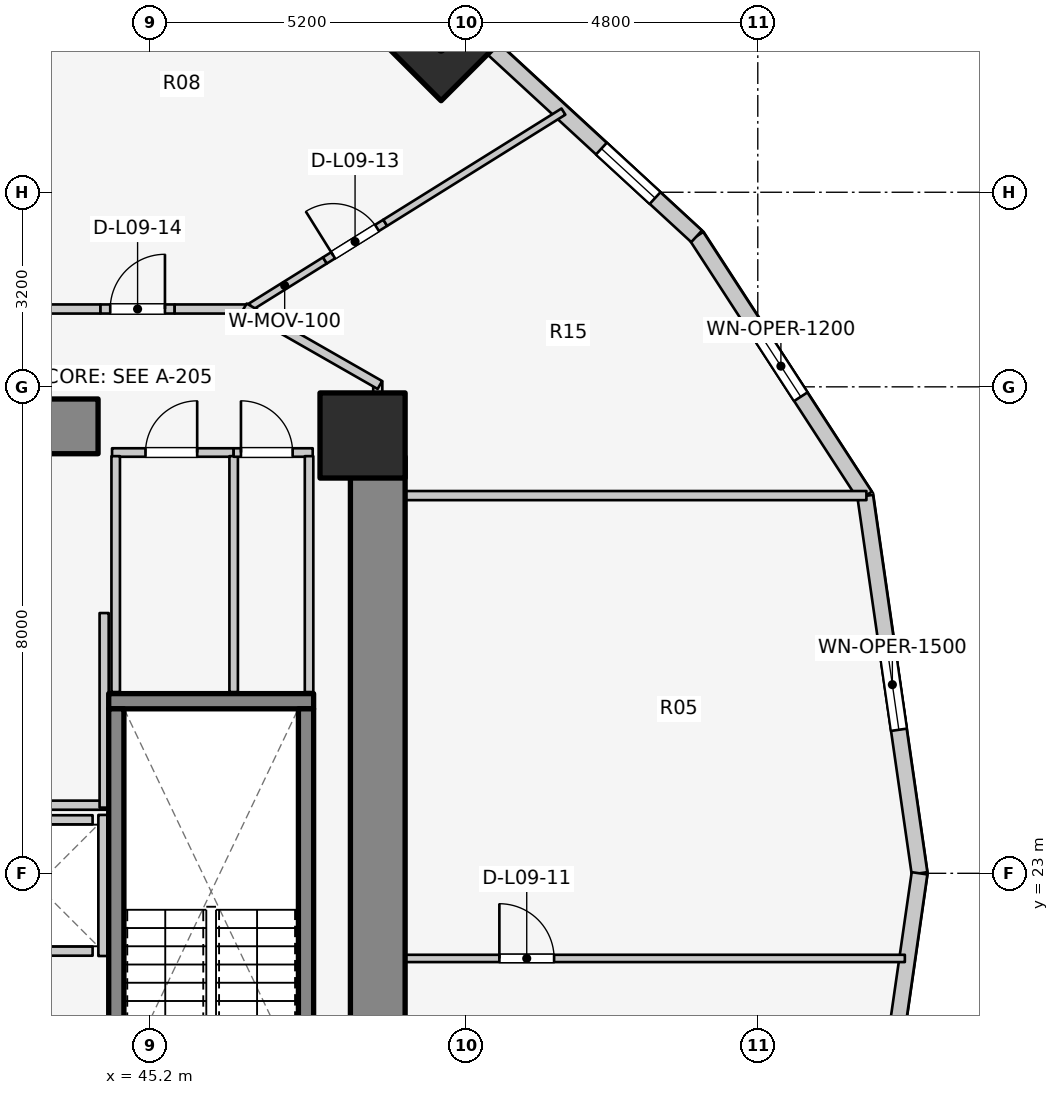
"""IFC4 building model, lengths in metres.
Left out: names, types, materials, properties, quantities, classifications, styles, units other than length and angle.
Written with IfcOpenShell. Run it as: python <this file> out.ifc"""

import sys

from ifc_helpers import new_model, si_unit, direction, frame, frame_2d, origin, origin_2d, place, context, subcontext, project, spatial, rectangle, extrude, element, fill, save


model = new_model("IFC4")
c1 = context("Model", 3, precision=1e-05, world=origin(), true_north=direction((0.0, 1.0)))
c2 = subcontext(c1, "Body", "Model", "MODEL_VIEW")
j1 = project(units=[si_unit("LENGTHUNIT", "METRE"), si_unit("PLANEANGLEUNIT", "RADIAN")], contexts=[c1])
p1 = place(None, origin())
s1 = spatial("IfcSite", under=j1, at=p1, CompositionType="ELEMENT")
p2 = place(p1, origin())
s2 = spatial("IfcBuilding", under=s1, at=p2, CompositionType="ELEMENT")
p3 = place(p2, frame((0.0, 0.0, 33.8)))
s3 = spatial("IfcBuildingStorey", under=s2, at=p3, CompositionType="ELEMENT", Elevation=33.8)
p4 = place(p3, frame((48.95, 17.05, 0.0), z_axis=(0.0, 0.0, 1.0), x_axis=(0.0, 1.0, 0.0)))
e1 = element("IfcWall", 1, at=p4, inside=s3, PredefinedType="SHEAR", context=c2, shape_type="SweptSolid", body=[
    extrude(rectangle(XDim=12.8, YDim=0.9, at=frame_2d((6.4, 0.0))), origin(), (0.0, 0.0, 1.0), 3.1),
])
p5 = place(p3, frame((39.85, 30.35, 0.0), z_axis=(0.0, 0.0, 1.0), x_axis=(1.0, 0.0, 0.0)))
e2 = element("IfcWall", 2, at=p5, inside=s3, PredefinedType="SHEAR", context=c2, shape_type="SweptSolid", body=[
    extrude(rectangle(XDim=4.5, YDim=0.9, at=frame_2d((2.25, 0.0))), origin(), (0.0, 0.0, 1.0), 3.1),
])
p6 = place(p3, frame((44.525, 25.83, 0.0), z_axis=(0.0, 0.0, 1.0), x_axis=(1.0, 0.0, 0.0)))
e3 = element("IfcWall", 3, at=p6, inside=s3, PredefinedType="SOLIDWALL", context=c2, shape_type="SweptSolid", body=[
    extrude(rectangle(XDim=3.37, YDim=0.25, at=frame_2d((1.685, 0.0))), origin(), (0.0, 0.0, 1.0), 3.1),
])
for number, where, z_axis, x_axis in (
    (4, (44.65, 17.895, 0.0), (0.0, 0.0, 1.0), (0.0, 1.0, 0.0)),
    (5, (47.77, 17.895, 0.0), (0.0, 0.0, 1.0), (0.0, 1.0, 0.0)),
):
    element("IfcWall", number, at=place(p3, frame(where, z_axis=z_axis, x_axis=x_axis)), inside=s3, PredefinedType="SOLIDWALL", context=c2, shape_type="SweptSolid", body=[
        extrude(rectangle(XDim=7.81, YDim=0.25, at=frame_2d((3.905, 0.0))), origin(), (0.0, 0.0, 1.0), 3.1),
    ])
p7 = place(p3, frame((48.7, 30.2, 0.0), z_axis=(0.0, 0.0, 1.0), x_axis=(1.0, 0.0, 0.0)))
e6 = element("IfcColumn", 6, at=p7, inside=s3, PredefinedType="COLUMN", context=c2, shape_type="SweptSolid", body=[
    extrude(rectangle(XDim=1.4, YDim=1.4, at=origin_2d()), origin(), (0.0, 0.0, 1.0), 3.1),
])
p8 = place(p3, frame((49.992, 36.554, 0.0), z_axis=(0.0, 0.0, 1.0), x_axis=(0.707106781187, 0.707106781187, 0.0)))
e7 = element("IfcColumn", 7, at=p8, inside=s3, PredefinedType="COLUMN", context=c2, shape_type="SweptSolid", body=[
    extrude(rectangle(XDim=1.2, YDim=1.2, at=origin_2d()), origin(), (0.0, 0.0, 1.0), 3.1),
])
p9 = place(p3, frame((57.86, 23.0, 0.0), z_axis=(0.0, 0.0, 1.0), x_axis=(-0.142528001686, 0.989790770181, 0.0)))
e8 = element("IfcWall", 8, at=p9, inside=s3, PredefinedType="STANDARD", context=c2, shape_type="SweptSolid", body=[
    extrude(rectangle(XDim=6.269, YDim=0.26, at=frame_2d((3.135, 0.0))), origin(), (0.0, 0.0, 1.0), 2.57),
])
p10 = place(p9, frame((2.385, 0.0, 0.75)))
e9 = element("IfcOpeningElement", 9, at=p10, cuts=e8, PredefinedType="OPENING", context=c2, shape_type="SweptSolid", body=[
    extrude(rectangle(XDim=1.5, YDim=1.6, at=frame_2d((0.75, 0.8))), frame((0.0, 0.14, 0.0), z_axis=(0.0, -1.0, 0.0), x_axis=(1.0, 0.0, 0.0)), (0.0, 0.0, 1.0), 0.28),
])
p11 = place(p3, frame((56.967, 29.205, 0.0), z_axis=(0.0, 0.0, 1.0), x_axis=(-0.544578722263, 0.838709732421, 0.0)))
e10 = element("IfcWall", 10, at=p11, inside=s3, PredefinedType="STANDARD", context=c2, shape_type="SweptSolid", body=[
    extrude(rectangle(XDim=5.092, YDim=0.26, at=frame_2d((2.546, 0.0))), origin(), (0.0, 0.0, 1.0), 1.22),
])
p12 = place(p11, frame((1.946, 0.0, 0.15)))
e11 = element("IfcOpeningElement", 11, at=p12, cuts=e10, PredefinedType="OPENING", context=c2, shape_type="SweptSolid", body=[
    extrude(rectangle(XDim=1.2, YDim=0.9, at=frame_2d((0.6, 0.45))), frame((0.0, 0.14, 0.0), z_axis=(0.0, -1.0, 0.0), x_axis=(1.0, 0.0, 0.0)), (0.0, 0.0, 1.0), 0.28),
])
p13 = place(p3, frame((54.194, 33.476, 0.0), z_axis=(0.0, 0.0, 1.0), x_axis=(-0.735655109293, 0.67735630223, 0.0)))
e12 = element("IfcWall", 12, at=p13, inside=s3, PredefinedType="STANDARD", context=c2, shape_type="SweptSolid", body=[
    extrude(rectangle(XDim=5.151, YDim=0.26, at=frame_2d((2.575, 0.0))), origin(), (0.0, 0.0, 1.0), 1.22),
])
p14 = place(p13, frame((0.929, 0.0, 0.15)))
e13 = element("IfcOpeningElement", 13, at=p14, cuts=e12, PredefinedType="OPENING", context=c2, shape_type="SweptSolid", body=[
    extrude(rectangle(XDim=1.2, YDim=0.9, at=frame_2d((0.6, 0.45))), frame((0.0, 0.14, 0.0), z_axis=(0.0, -1.0, 0.0), x_axis=(1.0, 0.0, 0.0)), (0.0, 0.0, 1.0), 0.28),
])
p15 = place(p3, frame((56.967, 16.795, 0.0), z_axis=(0.0, 0.0, 1.0), x_axis=(0.142528001686, 0.989790770181, 0.0)))
e14 = element("IfcWall", 14, at=p15, inside=s3, PredefinedType="STANDARD", context=c2, shape_type="SweptSolid", body=[
    extrude(rectangle(XDim=6.269, YDim=0.26, at=frame_2d((3.135, 0.0))), origin(), (0.0, 0.0, 1.0), 2.57),
])
p16 = place(p15, frame((1.852, 0.0, 0.75)))
e15 = element("IfcOpeningElement", 15, at=p16, cuts=e14, PredefinedType="OPENING", context=c2, shape_type="SweptSolid", body=[
    extrude(rectangle(XDim=1.2, YDim=1.5, at=frame_2d((0.6, 0.75))), frame((0.0, 0.14, 0.0), z_axis=(0.0, -1.0, 0.0), x_axis=(1.0, 0.0, 0.0)), (0.0, 0.0, 1.0), 0.28),
])
for number, where, z_axis, x_axis in (
    (16, (42.44, 21.72, 0.0), (0.0, 0.0, 1.0), (1.0, 0.0, 0.0)),
    (17, (42.44, 23.88, 0.0), (0.0, 0.0, 1.0), (1.0, 0.0, 0.0)),
):
    element("IfcWall", number, at=place(p3, frame(where, z_axis=z_axis, x_axis=x_axis)), inside=s3, PredefinedType="SOLIDWALL", context=c2, shape_type="SweptSolid", body=[
        extrude(rectangle(XDim=1.82, YDim=0.15, at=frame_2d((0.91, 0.0))), origin(), (0.0, 0.0, 1.0), 2.575),
    ])
p17 = place(p3, frame((44.43, 21.64, 0.0), z_axis=(0.0, 0.0, 1.0), x_axis=(0.0, 1.0, 0.0)))
e18 = element("IfcWall", 18, at=p17, inside=s3, PredefinedType="SOLIDWALL", context=c2, shape_type="SweptSolid", body=[
    extrude(rectangle(XDim=2.32, YDim=0.15, at=frame_2d((1.16, 0.0))), origin(), (0.0, 0.0, 1.0), 2.575),
])
p18 = place(p3, frame((39.4, 24.12, 0.0), z_axis=(0.0, 0.0, 1.0), x_axis=(1.0, 0.0, 0.0)))
e19 = element("IfcWall", 19, at=p18, inside=s3, PredefinedType="PARTITIONING", context=c2, shape_type="SweptSolid", body=[
    extrude(rectangle(XDim=5.08, YDim=0.15, at=frame_2d((2.54, 0.0))), origin(), (0.0, 0.0, 1.0), 2.12),
])
p19 = place(p3, frame((44.45, 24.08, 0.0), z_axis=(0.0, 0.0, 1.0), x_axis=(0.0, 1.0, 0.0)))
e20 = element("IfcWall", 20, at=p19, inside=s3, PredefinedType="PARTITIONING", context=c2, shape_type="SweptSolid", body=[
    extrude(rectangle(XDim=3.2, YDim=0.15, at=frame_2d((1.6, 0.0))), origin(), (0.0, 0.0, 1.0), 2.575),
])
p20 = place(p3, frame((44.58, 29.92, 0.0), z_axis=(0.0, 0.0, 1.0), x_axis=(1.0, 0.0, 0.0)))
e21 = element("IfcWall", 21, at=p20, inside=s3, PredefinedType="PLUMBINGWALL", context=c2, shape_type="SweptSolid", body=[
    extrude(rectangle(XDim=2.0, YDim=0.14, at=frame_2d((1.0, 0.0))), origin(), (0.0, 0.0, 1.0), 2.575),
])
p21 = place(p20, frame((0.55, 0.0, 0.0)))
e22 = element("IfcOpeningElement", 22, at=p21, cuts=e21, PredefinedType="OPENING", context=c2, shape_type="SweptSolid", body=[
    extrude(rectangle(XDim=0.85, YDim=2.05, at=frame_2d((0.425, 1.025))), frame((0.0, 0.08, 0.0), z_axis=(0.0, -1.0, 0.0), x_axis=(1.0, 0.0, 0.0)), (0.0, 0.0, 1.0), 0.16),
])
for number, where, z_axis, x_axis in (
    (23, (44.64, 25.98, 0.0), (0.0, 0.0, 1.0), (0.0, 1.0, 0.0)),
    (24, (46.58, 25.98, 0.0), (0.0, 0.0, 1.0), (0.0, 1.0, 0.0)),
):
    element("IfcWall", number, at=place(p3, frame(where, z_axis=z_axis, x_axis=x_axis)), inside=s3, PredefinedType="PLUMBINGWALL", context=c2, shape_type="SweptSolid", body=[
        extrude(rectangle(XDim=3.88, YDim=0.14, at=frame_2d((1.94, 0.0))), origin(), (0.0, 0.0, 1.0), 2.575),
    ])
p22 = place(p3, frame((46.58, 29.92, 0.0), z_axis=(0.0, 0.0, 1.0), x_axis=(1.0, 0.0, 0.0)))
e25 = element("IfcWall", 25, at=p22, inside=s3, PredefinedType="PLUMBINGWALL", context=c2, shape_type="SweptSolid", body=[
    extrude(rectangle(XDim=1.3, YDim=0.14, at=frame_2d((0.65, 0.0))), origin(), (0.0, 0.0, 1.0), 2.575),
])
p23 = place(p22, frame((0.12, 0.0, 0.0)))
e26 = element("IfcOpeningElement", 26, at=p23, cuts=e25, PredefinedType="OPENING", context=c2, shape_type="SweptSolid", body=[
    extrude(rectangle(XDim=0.85, YDim=2.05, at=frame_2d((0.425, 1.025))), frame((0.0, 0.08, 0.0), z_axis=(0.0, -1.0, 0.0), x_axis=(1.0, 0.0, 0.0)), (0.0, 0.0, 1.0), 0.16),
])
p24 = place(p3, frame((47.82, 25.98, 0.0), z_axis=(0.0, 0.0, 1.0), x_axis=(0.0, 1.0, 0.0)))
e27 = element("IfcWall", 27, at=p24, inside=s3, PredefinedType="PLUMBINGWALL", context=c2, shape_type="SweptSolid", body=[
    extrude(rectangle(XDim=3.88, YDim=0.14, at=frame_2d((1.94, 0.0))), origin(), (0.0, 0.0, 1.0), 2.575),
])
p25 = place(p3, frame((48.95, 29.212, 0.0), z_axis=(0.0, 0.0, 1.0), x_axis=(1.0, 0.0, 0.0)))
e28 = element("IfcWall", 28, at=p25, inside=s3, PredefinedType="PARTITIONING", context=c2, shape_type="SweptSolid", body=[
    extrude(rectangle(XDim=8.036, YDim=0.15, at=frame_2d((4.018, 0.0))), origin(), (0.0, 0.0, 1.0), 2.575),
])
p26 = place(p3, frame((48.95, 21.6, 0.0), z_axis=(0.0, 0.0, 1.0), x_axis=(1.0, 0.0, 0.0)))
e29 = element("IfcWall", 29, at=p26, inside=s3, PredefinedType="MOVABLE", context=c2, shape_type="SweptSolid", body=[
    extrude(rectangle(XDim=8.669, YDim=0.12, at=frame_2d((4.334, 0.0))), origin(), (0.0, 0.0, 1.0), 2.575),
])
p27 = place(p26, frame((2.0, 0.0, 0.0)))
e30 = element("IfcOpeningElement", 30, at=p27, cuts=e29, PredefinedType="OPENING", context=c2, shape_type="SweptSolid", body=[
    extrude(rectangle(XDim=0.9, YDim=2.1, at=frame_2d((0.45, 1.05))), frame((0.0, 0.07, 0.0), z_axis=(0.0, -1.0, 0.0), x_axis=(1.0, 0.0, 0.0)), (0.0, 0.0, 1.0), 0.14),
])
p28 = place(p3, frame((48.95, 29.8, 0.0), z_axis=(0.0, 0.0, 1.0), x_axis=(0.0, 1.0, 0.0)))
e31 = element("IfcWall", 31, at=p28, inside=s3, PredefinedType="PARTITIONING", context=c2, shape_type="SweptSolid", body=[
    extrude(rectangle(XDim=1.29, YDim=0.15, at=frame_2d((0.645, 0.0))), origin(), (0.0, 0.0, 1.0), 1.22),
])
p29 = place(p3, frame((46.758, 32.253, 0.0), z_axis=(0.0, 0.0, 1.0), x_axis=(0.848437888741, 0.529294954585, 0.0)))
e32 = element("IfcWall", 32, at=p29, inside=s3, PredefinedType="MOVABLE", context=c2, shape_type="SweptSolid", body=[
    extrude(rectangle(XDim=1.559, YDim=0.12, at=frame_2d((0.78, 0.0))), origin(), (0.0, 0.0, 1.0), 2.575),
])
p30 = place(p3, frame((48.08, 33.079, 0.0), z_axis=(0.0, 0.0, 1.0), x_axis=(0.848396621262, 0.529361098903, 0.0)))
e33 = element("IfcWall", 33, at=p30, inside=s3, PredefinedType="MOVABLE", context=c2, shape_type="SweptSolid", body=[
    extrude(rectangle(XDim=1.17, YDim=0.12, at=frame_2d((0.585, 0.0))), origin(), (0.0, 0.0, 1.0), 2.11),
])
p31 = place(p30, frame((0.16, 0.0, 0.0)))
e34 = element("IfcOpeningElement", 34, at=p31, cuts=e33, PredefinedType="OPENING", context=c2, shape_type="SweptSolid", body=[
    extrude(rectangle(XDim=0.85, YDim=2.05, at=frame_2d((0.425, 1.025))), frame((0.0, 0.07, 0.0), z_axis=(0.0, -1.0, 0.0), x_axis=(1.0, 0.0, 0.0)), (0.0, 0.0, 1.0), 0.14),
])
p32 = place(p3, frame((49.073, 33.698, 0.0), z_axis=(0.0, 0.0, 1.0), x_axis=(0.848407059389, 0.529344369555, 0.0)))
e35 = element("IfcWall", 35, at=p32, inside=s3, PredefinedType="MOVABLE", context=c2, shape_type="SweptSolid", body=[
    extrude(rectangle(XDim=3.454, YDim=0.12, at=frame_2d((1.727, 0.0))), origin(), (0.0, 0.0, 1.0), 1.22),
])
p33 = place(p3, frame((39.33, 32.28, 0.0), z_axis=(0.0, 0.0, 1.0), x_axis=(1.0, 0.0, 0.0)))
e36 = element("IfcWall", 36, at=p33, inside=s3, PredefinedType="PARTITIONING", context=c2, shape_type="SweptSolid", body=[
    extrude(rectangle(XDim=5.06, YDim=0.15, at=frame_2d((2.53, 0.0))), origin(), (0.0, 0.0, 1.0), 1.957),
])
p34 = place(p3, frame((44.39, 32.28, 0.0), z_axis=(0.0, 0.0, 1.0), x_axis=(1.0, 0.0, 0.0)))
e37 = element("IfcWall", 37, at=p34, inside=s3, PredefinedType="PARTITIONING", context=c2, shape_type="SweptSolid", body=[
    extrude(rectangle(XDim=1.22, YDim=0.15, at=frame_2d((0.61, 0.0))), origin(), (0.0, 0.0, 1.0), 2.575),
])
p35 = place(p34, frame((0.16, 0.0, 0.0)))
e38 = element("IfcOpeningElement", 38, at=p35, cuts=e37, PredefinedType="OPENING", context=c2, shape_type="SweptSolid", body=[
    extrude(rectangle(XDim=0.9, YDim=2.1, at=frame_2d((0.45, 1.05))), frame((0.0, 0.085, 0.0), z_axis=(0.0, -1.0, 0.0), x_axis=(1.0, 0.0, 0.0)), (0.0, 0.0, 1.0), 0.17),
])
p36 = place(p3, frame((45.61, 32.28, 0.0), z_axis=(0.0, 0.0, 1.0), x_axis=(1.0, 0.0, 0.0)))
e39 = element("IfcWall", 39, at=p36, inside=s3, PredefinedType="PARTITIONING", context=c2, shape_type="SweptSolid", body=[
    extrude(rectangle(XDim=1.24, YDim=0.15, at=frame_2d((0.62, 0.0))), origin(), (0.0, 0.0, 1.0), 2.575),
])
p37 = place(p3, frame((46.757, 32.305, 0.0), z_axis=(0.0, 0.0, 1.0), x_axis=(0.867991349648, -0.496579315857, 0.0)))
e40 = element("IfcWall", 40, at=p37, inside=s3, PredefinedType="PARTITIONING", context=c2, shape_type="SweptSolid", body=[
    extrude(rectangle(XDim=2.567, YDim=0.15, at=frame_2d((1.283, 0.0))), origin(), (0.0, 0.0, 1.0), 1.22),
])
p38 = place(p3, frame((37.108, 32.673, 0.0), z_axis=(0.0, 0.0, 1.0), x_axis=(0.78700868866, 0.616941912966, 0.0)))
e41 = element("IfcWall", 41, at=p38, inside=s3, PredefinedType="PARTITIONING", context=c2, shape_type="SweptSolid", body=[
    extrude(rectangle(XDim=10.583, YDim=0.18, at=frame_2d((5.292, 0.0))), origin(), (0.0, 0.0, 1.0), 1.957),
])
p39 = place(p10, origin())
e42 = element("IfcWindow", 42, at=p39, inside=s3, PartitioningType="SINGLE_PANEL", PredefinedType="WINDOW", context=c2, shape_type="SweptSolid", body=[
    extrude(rectangle(XDim=1.5, YDim=1.6, at=frame_2d((0.75, 0.8))), frame((0.0, 0.03, 0.0), z_axis=(0.0, -1.0, 0.0), x_axis=(1.0, 0.0, 0.0)), (0.0, 0.0, 1.0), 0.06),
])
fill(e9, e42)
p40 = place(p12, origin())
e43 = element("IfcWindow", 43, at=p40, inside=s3, PartitioningType="SINGLE_PANEL", PredefinedType="WINDOW", context=c2, shape_type="SweptSolid", body=[
    extrude(rectangle(XDim=1.2, YDim=0.9, at=frame_2d((0.6, 0.45))), frame((0.0, 0.03, 0.0), z_axis=(0.0, -1.0, 0.0), x_axis=(1.0, 0.0, 0.0)), (0.0, 0.0, 1.0), 0.06),
])
fill(e11, e43)
p41 = place(p14, origin())
e44 = element("IfcWindow", 44, at=p41, inside=s3, PartitioningType="SINGLE_PANEL", PredefinedType="WINDOW", context=c2, shape_type="SweptSolid", body=[
    extrude(rectangle(XDim=1.2, YDim=0.9, at=frame_2d((0.6, 0.45))), frame((0.0, 0.03, 0.0), z_axis=(0.0, -1.0, 0.0), x_axis=(1.0, 0.0, 0.0)), (0.0, 0.0, 1.0), 0.06),
])
fill(e13, e44)
p42 = place(p21, origin())
e45 = element("IfcDoor", 45, at=p42, inside=s3, OperationType="SINGLE_SWING_RIGHT", PredefinedType="DOOR", context=c2, shape_type="SweptSolid", body=[
    extrude(rectangle(XDim=0.85, YDim=2.05, at=frame_2d((0.425, 1.025))), frame((0.0, 0.025, 0.0), z_axis=(0.0, -1.0, 0.0), x_axis=(1.0, 0.0, 0.0)), (0.0, 0.0, 1.0), 0.05),
])
fill(e22, e45)
p43 = place(p23, origin())
e46 = element("IfcDoor", 46, at=p43, inside=s3, OperationType="SINGLE_SWING_LEFT", PredefinedType="DOOR", context=c2, shape_type="SweptSolid", body=[
    extrude(rectangle(XDim=0.85, YDim=2.05, at=frame_2d((0.425, 1.025))), frame((0.0, 0.025, 0.0), z_axis=(0.0, -1.0, 0.0), x_axis=(1.0, 0.0, 0.0)), (0.0, 0.0, 1.0), 0.05),
])
fill(e26, e46)
p44 = place(p27, origin())
e47 = element("IfcDoor", 47, at=p44, inside=s3, OperationType="SINGLE_SWING_LEFT", PredefinedType="DOOR", context=c2, shape_type="SweptSolid", body=[
    extrude(rectangle(XDim=0.9, YDim=2.1, at=frame_2d((0.45, 1.05))), frame((0.0, 0.025, 0.0), z_axis=(0.0, -1.0, 0.0), x_axis=(1.0, 0.0, 0.0)), (0.0, 0.0, 1.0), 0.05),
])
fill(e30, e47)
p45 = place(p31, origin())
e48 = element("IfcDoor", 48, at=p45, inside=s3, OperationType="SINGLE_SWING_LEFT", PredefinedType="DOOR", context=c2, shape_type="SweptSolid", body=[
    extrude(rectangle(XDim=0.85, YDim=2.05, at=frame_2d((0.425, 1.025))), frame((0.0, 0.025, 0.0), z_axis=(0.0, -1.0, 0.0), x_axis=(1.0, 0.0, 0.0)), (0.0, 0.0, 1.0), 0.05),
])
fill(e34, e48)
p46 = place(p35, origin())
e49 = element("IfcDoor", 49, at=p46, inside=s3, OperationType="SINGLE_SWING_RIGHT", PredefinedType="DOOR", context=c2, shape_type="SweptSolid", body=[
    extrude(rectangle(XDim=0.9, YDim=2.1, at=frame_2d((0.45, 1.05))), frame((0.0, 0.025, 0.0), z_axis=(0.0, -1.0, 0.0), x_axis=(1.0, 0.0, 0.0)), (0.0, 0.0, 1.0), 0.05),
])
fill(e38, e49)
save(model, sys.argv[1])
